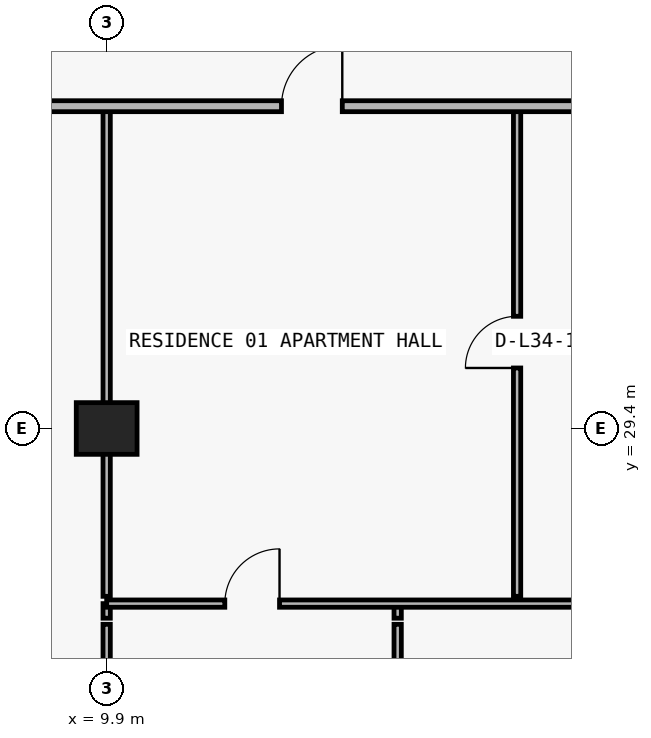
"""IFC4 building model, lengths in metres.
Left out: names, types, materials, properties, quantities, classifications, styles, units other than length and angle.
Written with IfcOpenShell. Run it as: python <this file> out.ifc"""

import sys

from ifc_helpers import new_model, si_unit, direction, frame, frame_2d, origin, origin_2d, place, context, subcontext, project, spatial, rectangle, extrude, element, fill, save


model = new_model("IFC4")
c1 = context("Model", 3, precision=1e-05, world=origin(), true_north=direction((0.0, 1.0)))
c2 = subcontext(c1, "Body", "Model", "MODEL_VIEW")
j1 = project(units=[si_unit("LENGTHUNIT", "METRE"), si_unit("PLANEANGLEUNIT", "RADIAN")], contexts=[c1])
p1 = place(None, origin())
s1 = spatial("IfcSite", under=j1, at=p1, CompositionType="ELEMENT")
p2 = place(p1, origin())
s2 = spatial("IfcBuilding", under=s1, at=p2, CompositionType="ELEMENT")
p3 = place(p2, frame((0.0, 0.0, 125.7)))
s3 = spatial("IfcBuildingStorey", under=s2, at=p3, CompositionType="ELEMENT", Elevation=125.7)
p4 = place(p3, frame((9.9, 29.4, 0.0), z_axis=(0.0, 0.0, 1.0), x_axis=(1.0, 0.0, 0.0)))
e1 = element("IfcColumn", 1, at=p4, inside=s3, PredefinedType="COLUMN", context=c2, shape_type="SweptSolid", body=[
    extrude(rectangle(XDim=1.0, YDim=0.85, at=origin_2d()), origin(), (0.0, 0.0, 1.0), 3.05),
])
p5 = place(p3, frame((9.9, 21.49, 0.0), z_axis=(0.0, 0.0, 1.0), x_axis=(0.0, 1.0, 0.0)))
e2 = element("IfcWall", 2, at=p5, inside=s3, PredefinedType="PARTITIONING", context=c2, shape_type="SweptSolid", body=[
    extrude(rectangle(XDim=4.69, YDim=0.12, at=frame_2d((2.345, 0.0))), origin(), (0.0, 0.0, 1.0), 2.174),
])
p6 = place(p5, frame((1.895, 0.0, 0.0)))
e3 = element("IfcOpeningElement", 3, at=p6, cuts=e2, PredefinedType="OPENING", context=c2, shape_type="SweptSolid", body=[
    extrude(rectangle(XDim=0.9, YDim=2.124, at=frame_2d((0.45, 1.062))), frame((0.0, 0.07, 0.0), z_axis=(0.0, -1.0, 0.0), x_axis=(1.0, 0.0, 0.0)), (0.0, 0.0, 1.0), 0.14),
])
p7 = place(p3, frame((9.9, 26.28, 0.0), z_axis=(0.0, 0.0, 1.0), x_axis=(0.0, 1.0, 0.0)))
e4 = element("IfcWall", 4, at=p7, inside=s3, PredefinedType="PARTITIONING", context=c2, shape_type="SweptSolid", body=[
    extrude(rectangle(XDim=0.24, YDim=0.12, at=frame_2d((0.12, 0.0))), origin(), (0.0, 0.0, 1.0), 2.174),
])
p8 = place(p3, frame((9.9, 26.64, 0.0), z_axis=(0.0, 0.0, 1.0), x_axis=(0.0, 1.0, 0.0)))
e5 = element("IfcWall", 5, at=p8, inside=s3, PredefinedType="PARTITIONING", context=c2, shape_type="SweptSolid", body=[
    extrude(rectangle(XDim=8.06, YDim=0.12, at=frame_2d((4.03, 0.0))), origin(), (0.0, 0.0, 1.0), 2.174),
])
p9 = place(p3, frame((14.686, 21.49, 0.0), z_axis=(0.0, 0.0, 1.0), x_axis=(0.0, 1.0, 0.0)))
e6 = element("IfcWall", 6, at=p9, inside=s3, PredefinedType="PARTITIONING", context=c2, shape_type="SweptSolid", body=[
    extrude(rectangle(XDim=4.69, YDim=0.12, at=frame_2d((2.345, 0.0))), origin(), (0.0, 0.0, 1.0), 3.05),
])
p10 = place(p9, frame((1.895, 0.0, 0.0)))
e7 = element("IfcOpeningElement", 7, at=p10, cuts=e6, PredefinedType="OPENING", context=c2, shape_type="SweptSolid", body=[
    extrude(rectangle(XDim=0.9, YDim=2.15, at=frame_2d((0.45, 1.075))), frame((0.0, 0.07, 0.0), z_axis=(0.0, -1.0, 0.0), x_axis=(1.0, 0.0, 0.0)), (0.0, 0.0, 1.0), 0.14),
])
p11 = place(p3, frame((14.686, 26.28, 0.0), z_axis=(0.0, 0.0, 1.0), x_axis=(0.0, 1.0, 0.0)))
e8 = element("IfcWall", 8, at=p11, inside=s3, PredefinedType="PARTITIONING", context=c2, shape_type="SweptSolid", body=[
    extrude(rectangle(XDim=0.24, YDim=0.12, at=frame_2d((0.12, 0.0))), origin(), (0.0, 0.0, 1.0), 3.05),
])
p12 = place(p3, frame((16.65, 26.64, 0.0), z_axis=(0.0, 0.0, 1.0), x_axis=(0.0, 1.0, 0.0)))
e9 = element("IfcWall", 9, at=p12, inside=s3, PredefinedType="PARTITIONING", context=c2, shape_type="SweptSolid", body=[
    extrude(rectangle(XDim=8.06, YDim=0.12, at=frame_2d((4.03, 0.0))), origin(), (0.0, 0.0, 1.0), 3.05),
])
p13 = place(p12, frame((3.755, 0.0, 0.0)))
e10 = element("IfcOpeningElement", 10, at=p13, cuts=e9, PredefinedType="OPENING", context=c2, shape_type="SweptSolid", body=[
    extrude(rectangle(XDim=0.85, YDim=2.1, at=frame_2d((0.425, 1.05))), frame((0.0, 0.07, 0.0), z_axis=(0.0, -1.0, 0.0), x_axis=(1.0, 0.0, 0.0)), (0.0, 0.0, 1.0), 0.14),
])
p14 = place(p3, frame((9.9, 26.52, 0.0), z_axis=(0.0, 0.0, 1.0), x_axis=(1.0, 0.0, 0.0)))
e11 = element("IfcWall", 11, at=p14, inside=s3, PredefinedType="PARTITIONING", context=c2, shape_type="SweptSolid", body=[
    extrude(rectangle(XDim=8.35, YDim=0.12, at=frame_2d((4.175, 0.0))), origin(), (0.0, 0.0, 1.0), 3.05),
])
p15 = place(p14, frame((1.943, 0.0, 0.0)))
e12 = element("IfcOpeningElement", 12, at=p15, cuts=e11, PredefinedType="OPENING", context=c2, shape_type="SweptSolid", body=[
    extrude(rectangle(XDim=0.9, YDim=2.15, at=frame_2d((0.45, 1.075))), frame((0.0, 0.07, 0.0), z_axis=(0.0, -1.0, 0.0), x_axis=(1.0, 0.0, 0.0)), (0.0, 0.0, 1.0), 0.14),
])
p16 = place(p3, frame((7.705, 34.7, 0.0), z_axis=(0.0, 0.0, 1.0), x_axis=(1.0, 0.0, 0.0)))
e13 = element("IfcWall", 13, at=p16, inside=s3, PredefinedType="PARTITIONING", context=c2, shape_type="SweptSolid", body=[
    extrude(rectangle(XDim=10.545, YDim=0.18, at=frame_2d((5.272, 0.0))), origin(), (0.0, 0.0, 1.0), 3.05),
])
p17 = place(p16, frame((5.07, 0.0, 0.0)))
e14 = element("IfcOpeningElement", 14, at=p17, cuts=e13, PredefinedType="OPENING", context=c2, shape_type="SweptSolid", body=[
    extrude(rectangle(XDim=1.0, YDim=2.2, at=frame_2d((0.5, 1.1))), frame((0.0, 0.1, 0.0), z_axis=(0.0, -1.0, 0.0), x_axis=(1.0, 0.0, 0.0)), (0.0, 0.0, 1.0), 0.2),
])
p18 = place(p17, origin())
e15 = element("IfcDoor", 15, at=p18, inside=s3, OperationType="SINGLE_SWING_RIGHT", PredefinedType="DOOR", context=c2, shape_type="SweptSolid", body=[
    extrude(rectangle(XDim=1.0, YDim=2.2, at=frame_2d((0.5, 1.1))), frame((0.0, 0.025, 0.0), z_axis=(0.0, -1.0, 0.0), x_axis=(1.0, 0.0, 0.0)), (0.0, 0.0, 1.0), 0.05),
])
fill(e14, e15)
p19 = place(p13, origin())
e16 = element("IfcDoor", 16, at=p19, inside=s3, OperationType="SINGLE_SWING_LEFT", PredefinedType="DOOR", context=c2, shape_type="SweptSolid", body=[
    extrude(rectangle(XDim=0.85, YDim=2.1, at=frame_2d((0.425, 1.05))), frame((0.0, 0.025, 0.0), z_axis=(0.0, -1.0, 0.0), x_axis=(1.0, 0.0, 0.0)), (0.0, 0.0, 1.0), 0.05),
])
fill(e10, e16)
p20 = place(p15, origin())
e17 = element("IfcDoor", 17, at=p20, inside=s3, OperationType="SINGLE_SWING_RIGHT", PredefinedType="DOOR", context=c2, shape_type="SweptSolid", body=[
    extrude(rectangle(XDim=0.9, YDim=2.15, at=frame_2d((0.45, 1.075))), frame((0.0, 0.025, 0.0), z_axis=(0.0, -1.0, 0.0), x_axis=(1.0, 0.0, 0.0)), (0.0, 0.0, 1.0), 0.05),
])
fill(e12, e17)
save(model, sys.argv[1])
